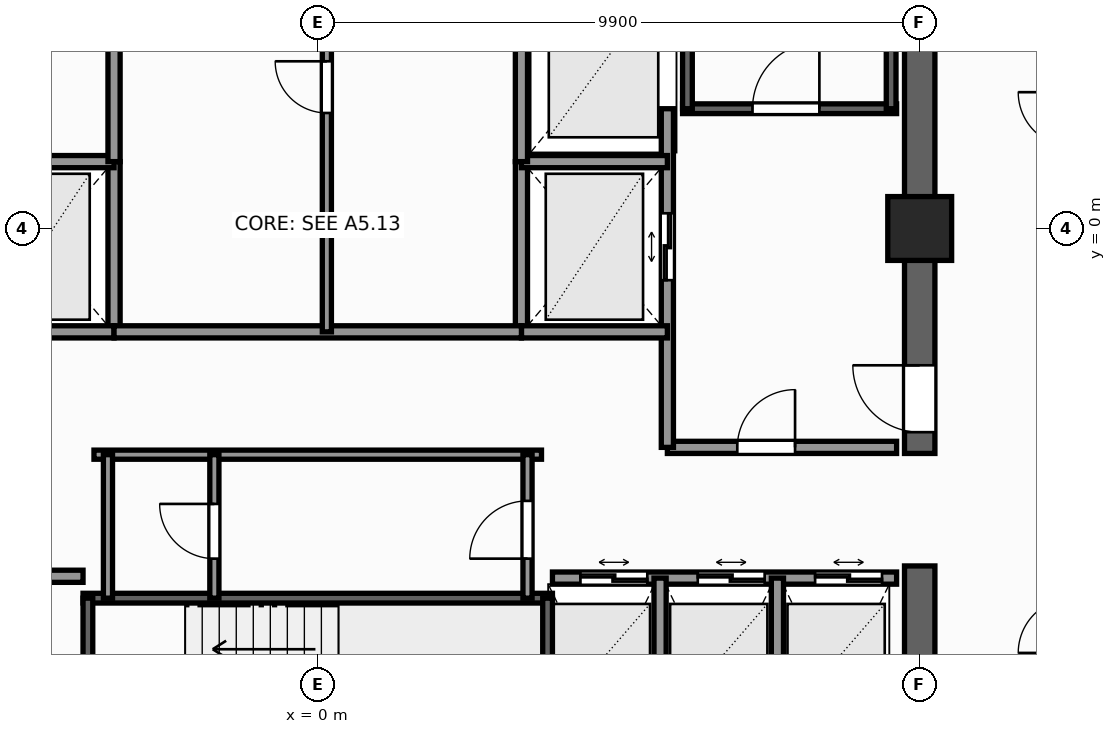
"""IFC4 building model, lengths in metres.
Left out: names, types, materials, properties, quantities, classifications, styles, units other than length and angle.
Written with IfcOpenShell. Run it as: python <this file> out.ifc"""

import sys

from ifc_helpers import new_model, si_unit, direction, frame, frame_2d, origin, origin_2d, place, context, subcontext, project, spatial, rectangle, extrude, element, fill, save


model = new_model("IFC4")
c1 = context("Model", 3, precision=1e-05, world=origin(), true_north=direction((0.0, 1.0)))
c2 = subcontext(c1, "Body", "Model", "MODEL_VIEW")
j1 = project(units=[si_unit("LENGTHUNIT", "METRE"), si_unit("PLANEANGLEUNIT", "RADIAN")], contexts=[c1])
p1 = place(None, origin())
s1 = spatial("IfcSite", under=j1, at=p1, CompositionType="ELEMENT")
p2 = place(p1, origin())
s2 = spatial("IfcBuilding", under=s1, at=p2, CompositionType="ELEMENT")
p3 = place(p2, frame((0.0, 0.0, 196.5)))
s3 = spatial("IfcBuildingStorey", under=s2, at=p3, CompositionType="ELEMENT", Elevation=196.5)
p4 = place(p3, frame((9.9, -9.65, 0.0), z_axis=(0.0, 0.0, 1.0), x_axis=(0.0, 1.0, 0.0)))
e1 = element("IfcWall", 1, at=p4, inside=s3, PredefinedType="SHEAR", context=c2, shape_type="SweptSolid", body=[
    extrude(rectangle(XDim=4.1, YDim=0.5, at=frame_2d((2.05, 0.0))), origin(), (0.0, 0.0, 1.0), 3.3),
])
p5 = place(p3, frame((9.9, -3.7, 0.0), z_axis=(0.0, 0.0, 1.0), x_axis=(0.0, 1.0, 0.0)))
e2 = element("IfcWall", 2, at=p5, inside=s3, PredefinedType="SHEAR", context=c2, shape_type="SweptSolid", body=[
    extrude(rectangle(XDim=13.35, YDim=0.5, at=frame_2d((6.675, 0.0))), origin(), (0.0, 0.0, 1.0), 3.3),
])
p6 = place(p5, frame((0.35, 0.0, 0.0)))
e3 = element("IfcOpeningElement", 3, at=p6, cuts=e2, PredefinedType="OPENING", context=c2, shape_type="SweptSolid", body=[
    extrude(rectangle(XDim=1.1, YDim=2.2, at=frame_2d((0.55, 1.1))), frame((0.0, 0.26, 0.0), z_axis=(0.0, -1.0, 0.0), x_axis=(1.0, 0.0, 0.0)), (0.0, 0.0, 1.0), 0.52),
])
p7 = place(p3, frame((9.9, 0.0, 0.0), z_axis=(0.0, 0.0, 1.0), x_axis=(1.0, 0.0, 0.0)))
e4 = element("IfcColumn", 4, at=p7, inside=s3, PredefinedType="COLUMN", context=c2, shape_type="SweptSolid", body=[
    extrude(rectangle(XDim=1.05, YDim=1.05, at=origin_2d()), origin(), (0.0, 0.0, 1.0), 3.3),
])
p8 = place(p3, frame((6.0, 1.97, 0.0), z_axis=(0.0, 0.0, 1.0), x_axis=(1.0, 0.0, 0.0)))
e5 = element("IfcWall", 5, at=p8, inside=s3, PredefinedType="SHEAR", context=c2, shape_type="SweptSolid", body=[
    extrude(rectangle(XDim=3.52, YDim=0.16, at=frame_2d((1.76, 0.0))), origin(), (0.0, 0.0, 1.0), 3.3),
])
p9 = place(p8, frame((1.15, 0.0, 0.0)))
e6 = element("IfcOpeningElement", 6, at=p9, cuts=e5, PredefinedType="OPENING", context=c2, shape_type="SweptSolid", body=[
    extrude(rectangle(XDim=1.1, YDim=2.2, at=frame_2d((0.55, 1.1))), frame((0.0, 0.09, 0.0), z_axis=(0.0, -1.0, 0.0), x_axis=(1.0, 0.0, 0.0)), (0.0, 0.0, 1.0), 0.18),
])
for number, where, z_axis, x_axis in (
    (7, (6.08, 1.97, 0.0), (0.0, 0.0, 1.0), (0.0, 1.0, 0.0)),
    (8, (9.43, 1.97, 0.0), (0.0, 0.0, 1.0), (0.0, 1.0, 0.0)),
):
    element("IfcWall", number, at=place(p3, frame(where, z_axis=z_axis, x_axis=x_axis)), inside=s3, PredefinedType="SHEAR", context=c2, shape_type="SweptSolid", body=[
        extrude(rectangle(XDim=7.56, YDim=0.16, at=frame_2d((3.78, 0.0))), origin(), (0.0, 0.0, 1.0), 3.3),
    ])
p10 = place(p3, frame((-3.86, -6.08, 0.0), z_axis=(0.0, 0.0, 1.0), x_axis=(1.0, 0.0, 0.0)))
e9 = element("IfcWall", 9, at=p10, inside=s3, PredefinedType="SHEAR", context=c2, shape_type="SweptSolid", body=[
    extrude(rectangle(XDim=7.72, YDim=0.16, at=frame_2d((3.86, 0.0))), origin(), (0.0, 0.0, 1.0), 3.3),
])
for number, where, z_axis, x_axis in (
    (10, (-3.78, -9.43, 0.0), (0.0, 0.0, 1.0), (0.0, 1.0, 0.0)),
    (11, (3.78, -9.43, 0.0), (0.0, 0.0, 1.0), (0.0, 1.0, 0.0)),
):
    element("IfcWall", number, at=place(p3, frame(where, z_axis=z_axis, x_axis=x_axis)), inside=s3, PredefinedType="SHEAR", context=c2, shape_type="SweptSolid", body=[
        extrude(rectangle(XDim=3.35, YDim=0.16, at=frame_2d((1.675, 0.0))), origin(), (0.0, 0.0, 1.0), 3.3),
    ])
p11 = place(p3, frame((-3.35, -1.7, 0.0), z_axis=(0.0, 0.0, 1.0), x_axis=(0.0, 1.0, 0.0)))
e12 = element("IfcWall", 12, at=p11, inside=s3, PredefinedType="SOLIDWALL", context=c2, shape_type="SweptSolid", body=[
    extrude(rectangle(XDim=2.8, YDim=0.2, at=frame_2d((1.4, 0.0))), origin(), (0.0, 0.0, 1.0), 3.08),
])
for number, where, z_axis, x_axis in (
    (13, (-5.75, -1.7, 0.0), (0.0, 0.0, 1.0), (1.0, 0.0, 0.0)),
    (14, (-5.75, 1.1, 0.0), (0.0, 0.0, 1.0), (1.0, 0.0, 0.0)),
):
    element("IfcWall", number, at=place(p3, frame(where, z_axis=z_axis, x_axis=x_axis)), inside=s3, PredefinedType="SOLIDWALL", context=c2, shape_type="SweptSolid", body=[
        extrude(rectangle(XDim=2.4, YDim=0.2, at=frame_2d((1.2, 0.0))), origin(), (0.0, 0.0, 1.0), 3.08),
    ])
p12 = place(p3, frame((5.75, -3.6, 0.0), z_axis=(0.0, 0.0, 1.0), x_axis=(1.0, 0.0, 0.0)))
e15 = element("IfcWall", 15, at=p12, inside=s3, PredefinedType="SOLIDWALL", context=c2, shape_type="SweptSolid", body=[
    extrude(rectangle(XDim=3.77, YDim=0.2, at=frame_2d((1.885, 0.0))), origin(), (0.0, 0.0, 1.0), 3.08),
])
p13 = place(p12, frame((1.15, 0.0, 0.0)))
e16 = element("IfcOpeningElement", 16, at=p13, cuts=e15, PredefinedType="OPENING", context=c2, shape_type="SweptSolid", body=[
    extrude(rectangle(XDim=0.95, YDim=2.06, at=frame_2d((0.475, 1.03))), frame((0.0, 0.11, 0.0), z_axis=(0.0, -1.0, 0.0), x_axis=(1.0, 0.0, 0.0)), (0.0, 0.0, 1.0), 0.22),
])
p14 = place(p3, frame((5.75, -3.6, 0.0), z_axis=(0.0, 0.0, 1.0), x_axis=(0.0, 1.0, 0.0)))
e17 = element("IfcWall", 17, at=p14, inside=s3, PredefinedType="SOLIDWALL", context=c2, shape_type="SweptSolid", body=[
    extrude(rectangle(XDim=5.57, YDim=0.2, at=frame_2d((2.785, 0.0))), origin(), (0.0, 0.0, 1.0), 3.08),
])
p15 = place(p14, frame((2.75, 0.0, 0.0)))
e18 = element("IfcOpeningElement", 18, at=p15, cuts=e17, PredefinedType="OPENING", context=c2, shape_type="SweptSolid", body=[
    extrude(rectangle(XDim=1.1, YDim=2.2, at=frame_2d((0.55, 1.1))), frame((0.0, 0.11, 0.0), z_axis=(0.0, -1.0, 0.0), x_axis=(1.0, 0.0, 0.0)), (0.0, 0.0, 1.0), 0.22),
])
p16 = place(p3, frame((3.35, -1.7, 0.0), z_axis=(0.0, 0.0, 1.0), x_axis=(0.0, 1.0, 0.0)))
e19 = element("IfcWall", 19, at=p16, inside=s3, PredefinedType="SOLIDWALL", context=c2, shape_type="SweptSolid", body=[
    extrude(rectangle(XDim=2.8, YDim=0.2, at=frame_2d((1.4, 0.0))), origin(), (0.0, 0.0, 1.0), 3.08),
])
for number, where, z_axis, x_axis in (
    (20, (3.35, -1.7, 0.0), (0.0, 0.0, 1.0), (1.0, 0.0, 0.0)),
    (21, (3.35, 1.1, 0.0), (0.0, 0.0, 1.0), (1.0, 0.0, 0.0)),
):
    element("IfcWall", number, at=place(p3, frame(where, z_axis=z_axis, x_axis=x_axis)), inside=s3, PredefinedType="SOLIDWALL", context=c2, shape_type="SweptSolid", body=[
        extrude(rectangle(XDim=2.4, YDim=0.2, at=frame_2d((1.2, 0.0))), origin(), (0.0, 0.0, 1.0), 3.08),
    ])
p17 = place(p3, frame((-9.52, -5.72, 0.0), z_axis=(0.0, 0.0, 1.0), x_axis=(1.0, 0.0, 0.0)))
e22 = element("IfcWall", 22, at=p17, inside=s3, PredefinedType="SOLIDWALL", context=c2, shape_type="SweptSolid", body=[
    extrude(rectangle(XDim=5.66, YDim=0.2, at=frame_2d((2.83, 0.0))), origin(), (0.0, 0.0, 1.0), 3.08),
])
p18 = place(p17, frame((2.8, 0.0, 0.0)))
e23 = element("IfcOpeningElement", 23, at=p18, cuts=e22, PredefinedType="OPENING", context=c2, shape_type="SweptSolid", body=[
    extrude(rectangle(XDim=0.95, YDim=2.06, at=frame_2d((0.475, 1.03))), frame((0.0, 0.11, 0.0), z_axis=(0.0, -1.0, 0.0), x_axis=(1.0, 0.0, 0.0)), (0.0, 0.0, 1.0), 0.22),
])
p19 = place(p3, frame((3.86, -5.75, 0.0), z_axis=(0.0, 0.0, 1.0), x_axis=(1.0, 0.0, 0.0)))
e24 = element("IfcWall", 24, at=p19, inside=s3, PredefinedType="SOLIDWALL", context=c2, shape_type="SweptSolid", body=[
    extrude(rectangle(XDim=5.66, YDim=0.2, at=frame_2d((2.83, 0.0))), origin(), (0.0, 0.0, 1.0), 3.08),
])
p20 = place(p19, frame((0.46, 0.0, 0.0)))
e25 = element("IfcOpeningElement", 25, at=p20, cuts=e24, PredefinedType="OPENING", context=c2, shape_type="SweptSolid", body=[
    extrude(rectangle(XDim=1.1, YDim=2.2, at=frame_2d((0.55, 1.1))), frame((0.0, 0.11, 0.0), z_axis=(0.0, -1.0, 0.0), x_axis=(1.0, 0.0, 0.0)), (0.0, 0.0, 1.0), 0.22),
])
p21 = place(p19, frame((2.39, 0.0, 0.0)))
e26 = element("IfcOpeningElement", 26, at=p21, cuts=e24, PredefinedType="OPENING", context=c2, shape_type="SweptSolid", body=[
    extrude(rectangle(XDim=1.1, YDim=2.2, at=frame_2d((0.55, 1.1))), frame((0.0, 0.11, 0.0), z_axis=(0.0, -1.0, 0.0), x_axis=(1.0, 0.0, 0.0)), (0.0, 0.0, 1.0), 0.22),
])
p22 = place(p19, frame((4.32, 0.0, 0.0)))
e27 = element("IfcOpeningElement", 27, at=p22, cuts=e24, PredefinedType="OPENING", context=c2, shape_type="SweptSolid", body=[
    extrude(rectangle(XDim=1.1, YDim=2.2, at=frame_2d((0.55, 1.1))), frame((0.0, 0.11, 0.0), z_axis=(0.0, -1.0, 0.0), x_axis=(1.0, 0.0, 0.0)), (0.0, 0.0, 1.0), 0.22),
])
for number, where, z_axis, x_axis in (
    (28, (5.63, -9.52, 0.0), (0.0, 0.0, 1.0), (0.0, 1.0, 0.0)),
    (29, (7.56, -9.52, 0.0), (0.0, 0.0, 1.0), (0.0, 1.0, 0.0)),
):
    element("IfcWall", number, at=place(p3, frame(where, z_axis=z_axis, x_axis=x_axis)), inside=s3, PredefinedType="SOLIDWALL", context=c2, shape_type="SweptSolid", body=[
        extrude(rectangle(XDim=3.77, YDim=0.2, at=frame_2d((1.885, 0.0))), origin(), (0.0, 0.0, 1.0), 3.08),
    ])
p23 = place(p3, frame((-3.35, -1.7, 0.0), z_axis=(0.0, 0.0, 1.0), x_axis=(1.0, 0.0, 0.0)))
e30 = element("IfcWall", 30, at=p23, inside=s3, PredefinedType="SOLIDWALL", context=c2, shape_type="SweptSolid", body=[
    extrude(rectangle(XDim=6.7, YDim=0.2, at=frame_2d((3.35, 0.0))), origin(), (0.0, 0.0, 1.0), 3.08),
])
for number, where, z_axis, x_axis in (
    (31, (-3.35, 1.1, 0.0), (0.0, 0.0, 1.0), (0.0, 1.0, 0.0)),
    (32, (3.35, 1.1, 0.0), (0.0, 0.0, 1.0), (0.0, 1.0, 0.0)),
):
    element("IfcWall", number, at=place(p3, frame(where, z_axis=z_axis, x_axis=x_axis)), inside=s3, PredefinedType="SOLIDWALL", context=c2, shape_type="SweptSolid", body=[
        extrude(rectangle(XDim=3.2, YDim=0.2, at=frame_2d((1.6, 0.0))), origin(), (0.0, 0.0, 1.0), 3.08),
    ])
p24 = place(p3, frame((0.15, -1.7, 0.0), z_axis=(0.0, 0.0, 1.0), x_axis=(0.0, 1.0, 0.0)))
e33 = element("IfcWall", 33, at=p24, inside=s3, PredefinedType="PARTITIONING", context=c2, shape_type="SweptSolid", body=[
    extrude(rectangle(XDim=6.0, YDim=0.15, at=frame_2d((3.0, 0.0))), origin(), (0.0, 0.0, 1.0), 3.08),
])
p25 = place(p24, frame((3.6, 0.0, 0.0)))
e34 = element("IfcOpeningElement", 34, at=p25, cuts=e33, PredefinedType="OPENING", context=c2, shape_type="SweptSolid", body=[
    extrude(rectangle(XDim=0.85, YDim=2.03, at=frame_2d((0.425, 1.015))), frame((0.0, 0.085, 0.0), z_axis=(0.0, -1.0, 0.0), x_axis=(1.0, 0.0, 0.0)), (0.0, 0.0, 1.0), 0.17),
])
p26 = place(p3, frame((-3.68, -3.72, 0.0), z_axis=(0.0, 0.0, 1.0), x_axis=(1.0, 0.0, 0.0)))
e35 = element("IfcWall", 35, at=p26, inside=s3, PredefinedType="PARTITIONING", context=c2, shape_type="SweptSolid", body=[
    extrude(rectangle(XDim=7.36, YDim=0.15, at=frame_2d((3.68, 0.0))), origin(), (0.0, 0.0, 1.0), 3.08),
])
p27 = place(p3, frame((3.45, -6.08, 0.0), z_axis=(0.0, 0.0, 1.0), x_axis=(0.0, 1.0, 0.0)))
e36 = element("IfcWall", 36, at=p27, inside=s3, PredefinedType="PARTITIONING", context=c2, shape_type="SweptSolid", body=[
    extrude(rectangle(XDim=2.36, YDim=0.15, at=frame_2d((1.18, 0.0))), origin(), (0.0, 0.0, 1.0), 3.08),
])
p28 = place(p27, frame((0.65, 0.0, 0.0)))
e37 = element("IfcOpeningElement", 37, at=p28, cuts=e36, PredefinedType="OPENING", context=c2, shape_type="SweptSolid", body=[
    extrude(rectangle(XDim=0.95, YDim=2.06, at=frame_2d((0.475, 1.03))), frame((0.0, 0.085, 0.0), z_axis=(0.0, -1.0, 0.0), x_axis=(1.0, 0.0, 0.0)), (0.0, 0.0, 1.0), 0.17),
])
p29 = place(p3, frame((-3.45, -6.08, 0.0), z_axis=(0.0, 0.0, 1.0), x_axis=(0.0, 1.0, 0.0)))
e38 = element("IfcWall", 38, at=p29, inside=s3, PredefinedType="PARTITIONING", context=c2, shape_type="SweptSolid", body=[
    extrude(rectangle(XDim=2.36, YDim=0.15, at=frame_2d((1.18, 0.0))), origin(), (0.0, 0.0, 1.0), 3.08),
])
p30 = place(p3, frame((-1.7, -6.08, 0.0), z_axis=(0.0, 0.0, 1.0), x_axis=(0.0, 1.0, 0.0)))
e39 = element("IfcWall", 39, at=p30, inside=s3, PredefinedType="PARTITIONING", context=c2, shape_type="SweptSolid", body=[
    extrude(rectangle(XDim=2.36, YDim=0.15, at=frame_2d((1.18, 0.0))), origin(), (0.0, 0.0, 1.0), 3.08),
])
p31 = place(p30, frame((0.65, 0.0, 0.0)))
e40 = element("IfcOpeningElement", 40, at=p31, cuts=e39, PredefinedType="OPENING", context=c2, shape_type="SweptSolid", body=[
    extrude(rectangle(XDim=0.9, YDim=2.06, at=frame_2d((0.45, 1.03))), frame((0.0, 0.085, 0.0), z_axis=(0.0, -1.0, 0.0), x_axis=(1.0, 0.0, 0.0)), (0.0, 0.0, 1.0), 0.17),
])
p32 = place(p9, origin())
e41 = element("IfcDoor", 41, at=p32, inside=s3, OperationType="SINGLE_SWING_RIGHT", PredefinedType="DOOR", context=c2, shape_type="SweptSolid", body=[
    extrude(rectangle(XDim=1.1, YDim=2.2, at=frame_2d((0.55, 1.1))), frame((0.0, 0.025, 0.0), z_axis=(0.0, -1.0, 0.0), x_axis=(1.0, 0.0, 0.0)), (0.0, 0.0, 1.0), 0.05),
])
fill(e6, e41)
p33 = place(p6, origin())
e42 = element("IfcDoor", 42, at=p33, inside=s3, OperationType="SINGLE_SWING_RIGHT", PredefinedType="DOOR", context=c2, shape_type="SweptSolid", body=[
    extrude(rectangle(XDim=1.1, YDim=2.2, at=frame_2d((0.55, 1.1))), frame((0.0, 0.025, 0.0), z_axis=(0.0, -1.0, 0.0), x_axis=(1.0, 0.0, 0.0)), (0.0, 0.0, 1.0), 0.05),
])
fill(e3, e42)
p34 = place(p15, origin())
e43 = element("IfcDoor", 43, at=p34, inside=s3, OperationType="DOUBLE_DOOR_SLIDING", PredefinedType="DOOR", context=c2, shape_type="SweptSolid", body=[
    extrude(rectangle(XDim=1.1, YDim=2.2, at=frame_2d((0.55, 1.1))), frame((0.0, 0.025, 0.0), z_axis=(0.0, -1.0, 0.0), x_axis=(1.0, 0.0, 0.0)), (0.0, 0.0, 1.0), 0.05),
])
fill(e18, e43)
p35 = place(p20, origin())
e44 = element("IfcDoor", 44, at=p35, inside=s3, OperationType="DOUBLE_DOOR_SLIDING", PredefinedType="DOOR", context=c2, shape_type="SweptSolid", body=[
    extrude(rectangle(XDim=1.1, YDim=2.2, at=frame_2d((0.55, 1.1))), frame((0.0, 0.025, 0.0), z_axis=(0.0, -1.0, 0.0), x_axis=(1.0, 0.0, 0.0)), (0.0, 0.0, 1.0), 0.05),
])
fill(e25, e44)
p36 = place(p21, origin())
e45 = element("IfcDoor", 45, at=p36, inside=s3, OperationType="DOUBLE_DOOR_SLIDING", PredefinedType="DOOR", context=c2, shape_type="SweptSolid", body=[
    extrude(rectangle(XDim=1.1, YDim=2.2, at=frame_2d((0.55, 1.1))), frame((0.0, 0.025, 0.0), z_axis=(0.0, -1.0, 0.0), x_axis=(1.0, 0.0, 0.0)), (0.0, 0.0, 1.0), 0.05),
])
fill(e26, e45)
p37 = place(p22, origin())
e46 = element("IfcDoor", 46, at=p37, inside=s3, OperationType="DOUBLE_DOOR_SLIDING", PredefinedType="DOOR", context=c2, shape_type="SweptSolid", body=[
    extrude(rectangle(XDim=1.1, YDim=2.2, at=frame_2d((0.55, 1.1))), frame((0.0, 0.025, 0.0), z_axis=(0.0, -1.0, 0.0), x_axis=(1.0, 0.0, 0.0)), (0.0, 0.0, 1.0), 0.05),
])
fill(e27, e46)
p38 = place(p13, origin())
e47 = element("IfcDoor", 47, at=p38, inside=s3, OperationType="SINGLE_SWING_RIGHT", PredefinedType="DOOR", context=c2, shape_type="SweptSolid", body=[
    extrude(rectangle(XDim=0.95, YDim=2.06, at=frame_2d((0.475, 1.03))), frame((0.0, 0.025, 0.0), z_axis=(0.0, -1.0, 0.0), x_axis=(1.0, 0.0, 0.0)), (0.0, 0.0, 1.0), 0.05),
])
fill(e16, e47)
p39 = place(p25, origin())
e48 = element("IfcDoor", 48, at=p39, inside=s3, OperationType="SINGLE_SWING_RIGHT", PredefinedType="DOOR", context=c2, shape_type="SweptSolid", body=[
    extrude(rectangle(XDim=0.85, YDim=2.03, at=frame_2d((0.425, 1.015))), frame((0.0, 0.025, 0.0), z_axis=(0.0, -1.0, 0.0), x_axis=(1.0, 0.0, 0.0)), (0.0, 0.0, 1.0), 0.05),
])
fill(e34, e48)
p40 = place(p28, origin())
e49 = element("IfcDoor", 49, at=p40, inside=s3, OperationType="SINGLE_SWING_LEFT", PredefinedType="DOOR", context=c2, shape_type="SweptSolid", body=[
    extrude(rectangle(XDim=0.95, YDim=2.06, at=frame_2d((0.475, 1.03))), frame((0.0, 0.025, 0.0), z_axis=(0.0, -1.0, 0.0), x_axis=(1.0, 0.0, 0.0)), (0.0, 0.0, 1.0), 0.05),
])
fill(e37, e49)
p41 = place(p31, origin())
e50 = element("IfcDoor", 50, at=p41, inside=s3, OperationType="SINGLE_SWING_RIGHT", PredefinedType="DOOR", context=c2, shape_type="SweptSolid", body=[
    extrude(rectangle(XDim=0.9, YDim=2.06, at=frame_2d((0.45, 1.03))), frame((0.0, 0.025, 0.0), z_axis=(0.0, -1.0, 0.0), x_axis=(1.0, 0.0, 0.0)), (0.0, 0.0, 1.0), 0.05),
])
fill(e40, e50)
save(model, sys.argv[1])
